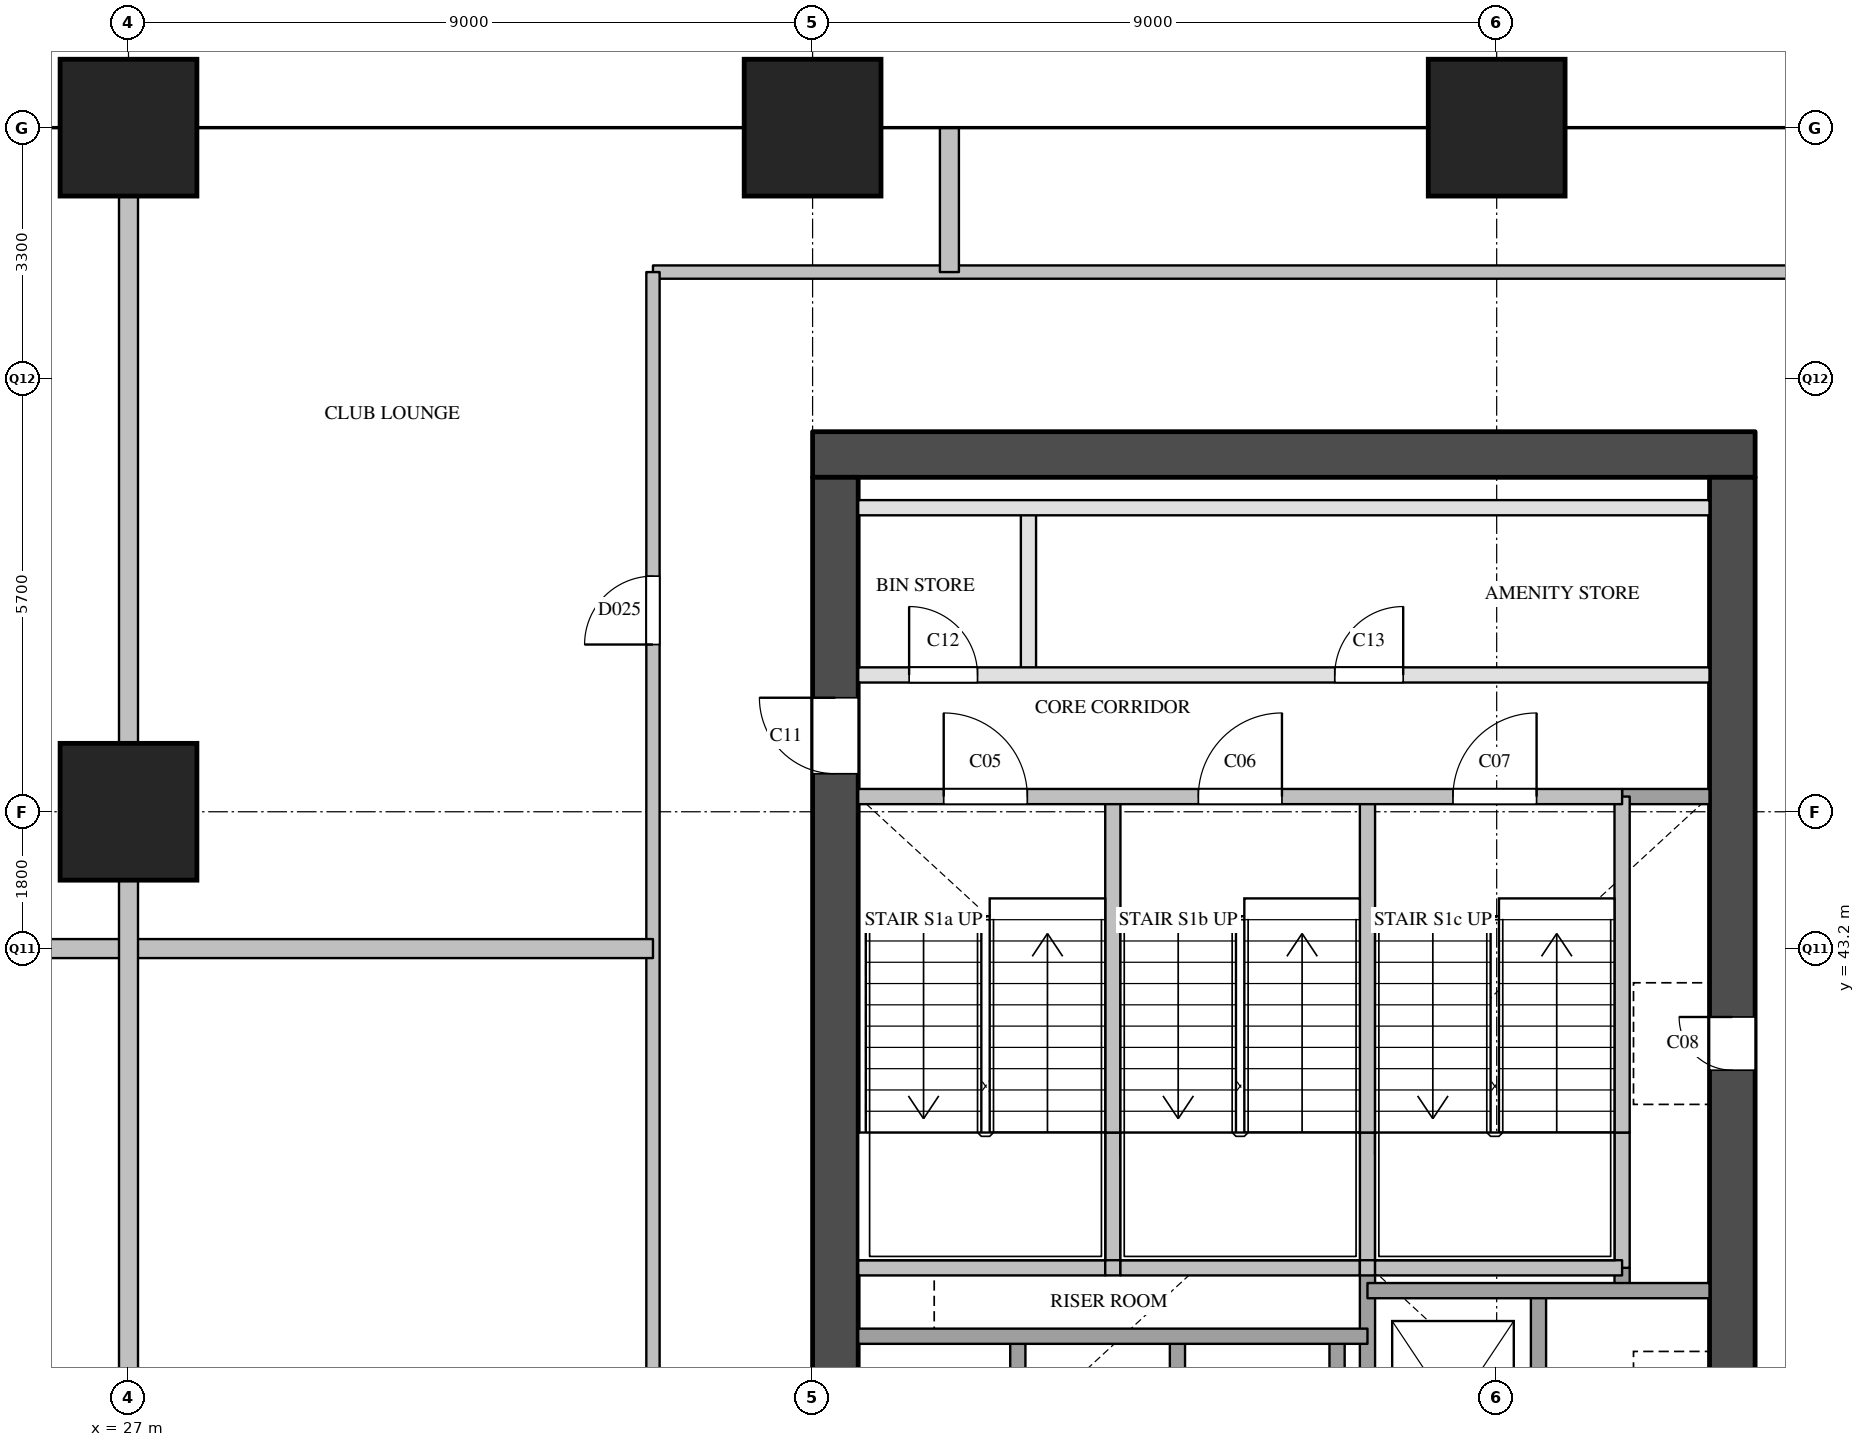
"""IFC4 building model, lengths in metres.
Left out: names, types, materials, properties, quantities, classifications, styles, units other than length and angle.
Written with IfcOpenShell. Run it as: python <this file> out.ifc"""

import sys

from ifc_helpers import new_model, si_unit, direction, frame, frame_2d, origin, origin_2d, place, context, subcontext, project, spatial, rectangle, extrude, element, fill, save


model = new_model("IFC4")
c1 = context("Model", 3, precision=1e-05, world=origin(), true_north=direction((0.0, 1.0)))
c2 = subcontext(c1, "Body", "Model", "MODEL_VIEW")
j1 = project(units=[si_unit("LENGTHUNIT", "METRE"), si_unit("PLANEANGLEUNIT", "RADIAN")], contexts=[c1])
p1 = place(None, origin())
s1 = spatial("IfcSite", under=j1, at=p1, CompositionType="ELEMENT")
p2 = place(p1, origin())
s2 = spatial("IfcBuilding", under=s1, at=p2, CompositionType="ELEMENT")
p3 = place(p2, frame((0.0, 0.0, 61.4)))
s3 = spatial("IfcBuildingStorey", under=s2, at=p3, CompositionType="ELEMENT", Elevation=61.4)
for number, where, z_axis, x_axis in (
    (1, (27.0, 45.0, 0.0), (0.0, 0.0, 1.0), (1.0, 0.0, 0.0)),
    (2, (27.0, 54.0, 0.0), (0.0, 0.0, 1.0), (1.0, 0.0, 0.0)),
    (3, (36.0, 54.0, 0.0), (0.0, 0.0, 1.0), (1.0, 0.0, 0.0)),
    (4, (45.0, 54.0, 0.0), (0.0, 0.0, 1.0), (1.0, 0.0, 0.0)),
):
    element("IfcColumn", number, at=place(p3, frame(where, z_axis=z_axis, x_axis=x_axis)), inside=s3, PredefinedType="COLUMN", context=c2, shape_type="SweptSolid", body=[
        extrude(rectangle(XDim=1.8, YDim=1.8, at=origin_2d()), origin(), (0.0, 0.0, 1.0), 3.8),
    ])
p4 = place(p3, frame((36.0, 49.7, 0.0), z_axis=(0.0, 0.0, 1.0), x_axis=(1.0, 0.0, 0.0)))
e5 = element("IfcWall", 5, at=p4, inside=s3, PredefinedType="SHEAR", context=c2, shape_type="SweptSolid", body=[
    extrude(rectangle(XDim=12.4, YDim=0.6, at=frame_2d((6.2, 0.0))), origin(), (0.0, 0.0, 1.0), 3.5),
])
p5 = place(p3, frame((36.3, 29.1, 0.0), z_axis=(0.0, 0.0, 1.0), x_axis=(0.0, 1.0, 0.0)))
e6 = element("IfcWall", 6, at=p5, inside=s3, PredefinedType="SHEAR", context=c2, shape_type="SweptSolid", body=[
    extrude(rectangle(XDim=20.3, YDim=0.6, at=frame_2d((10.15, 0.0))), origin(), (0.0, 0.0, 1.0), 3.5),
])
p6 = place(p5, frame((3.6, 0.0, 0.0)))
e7 = element("IfcOpeningElement", 7, at=p6, cuts=e6, PredefinedType="OPENING", context=c2, shape_type="SweptSolid", body=[
    extrude(rectangle(XDim=1.8, YDim=2.1, at=frame_2d((0.9, 1.05))), frame((0.0, 0.31, 0.0), z_axis=(0.0, -1.0, 0.0), x_axis=(1.0, 0.0, 0.0)), (0.0, 0.0, 1.0), 0.62),
])
p7 = place(p5, frame((16.4, 0.0, 0.0)))
e8 = element("IfcOpeningElement", 8, at=p7, cuts=e6, PredefinedType="OPENING", context=c2, shape_type="SweptSolid", body=[
    extrude(rectangle(XDim=1.0, YDim=2.1, at=frame_2d((0.5, 1.05))), frame((0.0, 0.31, 0.0), z_axis=(0.0, -1.0, 0.0), x_axis=(1.0, 0.0, 0.0)), (0.0, 0.0, 1.0), 0.62),
])
p8 = place(p3, frame((48.1, 29.1, 0.0), z_axis=(0.0, 0.0, 1.0), x_axis=(0.0, 1.0, 0.0)))
e9 = element("IfcWall", 9, at=p8, inside=s3, PredefinedType="SHEAR", context=c2, shape_type="SweptSolid", body=[
    extrude(rectangle(XDim=20.3, YDim=0.6, at=frame_2d((10.15, 0.0))), origin(), (0.0, 0.0, 1.0), 3.5),
])
p9 = place(p8, frame((12.5, 0.0, 0.0)))
e10 = element("IfcOpeningElement", 10, at=p9, cuts=e9, PredefinedType="OPENING", context=c2, shape_type="SweptSolid", body=[
    extrude(rectangle(XDim=0.7, YDim=2.1, at=frame_2d((0.35, 1.05))), frame((0.0, 0.31, 0.0), z_axis=(0.0, -1.0, 0.0), x_axis=(1.0, 0.0, 0.0)), (0.0, 0.0, 1.0), 0.62),
])
p10 = place(p8, frame((3.9, 0.0, 0.0)))
e11 = element("IfcOpeningElement", 11, at=p10, cuts=e9, PredefinedType="OPENING", context=c2, shape_type="SweptSolid", body=[
    extrude(rectangle(XDim=1.8, YDim=2.1, at=frame_2d((0.9, 1.05))), frame((0.0, 0.31, 0.0), z_axis=(0.0, -1.0, 0.0), x_axis=(1.0, 0.0, 0.0)), (0.0, 0.0, 1.0), 0.62),
])
p11 = place(p3, frame((38.7, 34.9, 0.0), z_axis=(0.0, 0.0, 1.0), x_axis=(0.0, 1.0, 0.0)))
e12 = element("IfcWall", 12, at=p11, inside=s3, PredefinedType="SOLIDWALL", context=c2, shape_type="SweptSolid", body=[
    extrude(rectangle(XDim=3.2, YDim=0.2, at=frame_2d((1.6, 0.0))), origin(), (0.0, 0.0, 1.0), 3.5),
])
p12 = place(p3, frame((38.84, 46.8, 0.0), z_axis=(0.0, 0.0, 1.0), x_axis=(0.0, 1.0, 0.0)))
e13 = element("IfcWall", 13, at=p12, inside=s3, PredefinedType="PARTITIONING", context=c2, shape_type="SweptSolid", body=[
    extrude(rectangle(XDim=2.2, YDim=0.2, at=frame_2d((1.1, 0.0))), origin(), (0.0, 0.0, 1.0), 3.5),
])
p13 = place(p3, frame((39.95, 39.0, 0.0), z_axis=(0.0, 0.0, 1.0), x_axis=(0.0, 1.0, 0.0)))
e14 = element("IfcWall", 14, at=p13, inside=s3, PredefinedType="SOLIDWALL", context=c2, shape_type="SweptSolid", body=[
    extrude(rectangle(XDim=1.78, YDim=0.2, at=frame_2d((0.89, 0.0))), origin(), (0.0, 0.0, 1.0), 3.5),
])
p14 = place(p3, frame((39.95, 40.78, 0.0), z_axis=(0.0, 0.0, 1.0), x_axis=(0.0, 1.0, 0.0)))
e15 = element("IfcWall", 15, at=p14, inside=s3, PredefinedType="SOLIDWALL", context=c2, shape_type="SweptSolid", body=[
    extrude(rectangle(XDim=4.42, YDim=0.2, at=frame_2d((2.21, 0.0))), origin(), (0.0, 0.0, 1.0), 3.5),
])
for number, where, z_axis, x_axis in (
    (16, (40.8, 34.9, 0.0), (0.0, 0.0, 1.0), (0.0, 1.0, 0.0)),
    (17, (42.9, 34.9, 0.0), (0.0, 0.0, 1.0), (0.0, 1.0, 0.0)),
):
    element("IfcWall", number, at=place(p3, frame(where, z_axis=z_axis, x_axis=x_axis)), inside=s3, PredefinedType="SOLIDWALL", context=c2, shape_type="SweptSolid", body=[
        extrude(rectangle(XDim=3.2, YDim=0.2, at=frame_2d((1.6, 0.0))), origin(), (0.0, 0.0, 1.0), 3.5),
    ])
p15 = place(p3, frame((43.3, 29.1, 0.0), z_axis=(0.0, 0.0, 1.0), x_axis=(0.0, 1.0, 0.0)))
e18 = element("IfcWall", 18, at=p15, inside=s3, PredefinedType="SOLIDWALL", context=c2, shape_type="SweptSolid", body=[
    extrude(rectangle(XDim=9.9, YDim=0.2, at=frame_2d((4.95, 0.0))), origin(), (0.0, 0.0, 1.0), 3.5),
])
p16 = place(p3, frame((43.3, 39.0, 0.0), z_axis=(0.0, 0.0, 1.0), x_axis=(0.0, 1.0, 0.0)))
e19 = element("IfcWall", 19, at=p16, inside=s3, PredefinedType="SOLIDWALL", context=c2, shape_type="SweptSolid", body=[
    extrude(rectangle(XDim=1.78, YDim=0.2, at=frame_2d((0.89, 0.0))), origin(), (0.0, 0.0, 1.0), 3.5),
])
p17 = place(p3, frame((43.3, 40.78, 0.0), z_axis=(0.0, 0.0, 1.0), x_axis=(0.0, 1.0, 0.0)))
e20 = element("IfcWall", 20, at=p17, inside=s3, PredefinedType="SOLIDWALL", context=c2, shape_type="SweptSolid", body=[
    extrude(rectangle(XDim=4.42, YDim=0.2, at=frame_2d((2.21, 0.0))), origin(), (0.0, 0.0, 1.0), 3.5),
])
p18 = place(p3, frame((45.55, 35.5, 0.0), z_axis=(0.0, 0.0, 1.0), x_axis=(0.0, 1.0, 0.0)))
e21 = element("IfcWall", 21, at=p18, inside=s3, PredefinedType="SOLIDWALL", context=c2, shape_type="SweptSolid", body=[
    extrude(rectangle(XDim=3.2, YDim=0.2, at=frame_2d((1.6, 0.0))), origin(), (0.0, 0.0, 1.0), 3.5),
])
p19 = place(p3, frame((46.65, 38.7, 0.0), z_axis=(0.0, 0.0, 1.0), x_axis=(0.0, 1.0, 0.0)))
e22 = element("IfcWall", 22, at=p19, inside=s3, PredefinedType="SOLIDWALL", context=c2, shape_type="SweptSolid", body=[
    extrude(rectangle(XDim=0.3, YDim=0.2, at=frame_2d((0.15, 0.0))), origin(), (0.0, 0.0, 1.0), 3.5),
])
p20 = place(p3, frame((46.65, 39.0, 0.0), z_axis=(0.0, 0.0, 1.0), x_axis=(0.0, 1.0, 0.0)))
e23 = element("IfcWall", 23, at=p20, inside=s3, PredefinedType="SOLIDWALL", context=c2, shape_type="SweptSolid", body=[
    extrude(rectangle(XDim=1.78, YDim=0.2, at=frame_2d((0.89, 0.0))), origin(), (0.0, 0.0, 1.0), 3.5),
])
p21 = place(p3, frame((46.65, 40.78, 0.0), z_axis=(0.0, 0.0, 1.0), x_axis=(0.0, 1.0, 0.0)))
e24 = element("IfcWall", 24, at=p21, inside=s3, PredefinedType="SOLIDWALL", context=c2, shape_type="SweptSolid", body=[
    extrude(rectangle(XDim=4.42, YDim=0.2, at=frame_2d((2.21, 0.0))), origin(), (0.0, 0.0, 1.0), 3.5),
])
p22 = place(p3, frame((36.6, 38.1, 0.0), z_axis=(0.0, 0.0, 1.0), x_axis=(1.0, 0.0, 0.0)))
e25 = element("IfcWall", 25, at=p22, inside=s3, PredefinedType="SOLIDWALL", context=c2, shape_type="SweptSolid", body=[
    extrude(rectangle(XDim=6.7, YDim=0.2, at=frame_2d((3.35, 0.0))), origin(), (0.0, 0.0, 1.0), 3.5),
])
p23 = place(p3, frame((43.3, 38.7, 0.0), z_axis=(0.0, 0.0, 1.0), x_axis=(1.0, 0.0, 0.0)))
e26 = element("IfcWall", 26, at=p23, inside=s3, PredefinedType="SOLIDWALL", context=c2, shape_type="SweptSolid", body=[
    extrude(rectangle(XDim=4.5, YDim=0.2, at=frame_2d((2.25, 0.0))), origin(), (0.0, 0.0, 1.0), 3.5),
])
p24 = place(p3, frame((36.6, 39.0, 0.0), z_axis=(0.0, 0.0, 1.0), x_axis=(1.0, 0.0, 0.0)))
e27 = element("IfcWall", 27, at=p24, inside=s3, PredefinedType="SOLIDWALL", context=c2, shape_type="SweptSolid", body=[
    extrude(rectangle(XDim=3.25, YDim=0.2, at=frame_2d((1.625, 0.0))), origin(), (0.0, 0.0, 1.0), 3.5),
])
p25 = place(p3, frame((39.85, 39.0, 0.0), z_axis=(0.0, 0.0, 1.0), x_axis=(1.0, 0.0, 0.0)))
e28 = element("IfcWall", 28, at=p25, inside=s3, PredefinedType="SOLIDWALL", context=c2, shape_type="SweptSolid", body=[
    extrude(rectangle(XDim=0.2, YDim=0.2, at=frame_2d((0.1, 0.0))), origin(), (0.0, 0.0, 1.0), 3.5),
])
p26 = place(p3, frame((40.05, 39.0, 0.0), z_axis=(0.0, 0.0, 1.0), x_axis=(1.0, 0.0, 0.0)))
e29 = element("IfcWall", 29, at=p26, inside=s3, PredefinedType="SOLIDWALL", context=c2, shape_type="SweptSolid", body=[
    extrude(rectangle(XDim=3.15, YDim=0.2, at=frame_2d((1.575, 0.0))), origin(), (0.0, 0.0, 1.0), 3.5),
])
p27 = place(p3, frame((43.2, 39.0, 0.0), z_axis=(0.0, 0.0, 1.0), x_axis=(1.0, 0.0, 0.0)))
e30 = element("IfcWall", 30, at=p27, inside=s3, PredefinedType="SOLIDWALL", context=c2, shape_type="SweptSolid", body=[
    extrude(rectangle(XDim=0.2, YDim=0.2, at=frame_2d((0.1, 0.0))), origin(), (0.0, 0.0, 1.0), 3.5),
])
p28 = place(p3, frame((43.4, 39.0, 0.0), z_axis=(0.0, 0.0, 1.0), x_axis=(1.0, 0.0, 0.0)))
e31 = element("IfcWall", 31, at=p28, inside=s3, PredefinedType="SOLIDWALL", context=c2, shape_type="SweptSolid", body=[
    extrude(rectangle(XDim=3.25, YDim=0.2, at=frame_2d((1.625, 0.0))), origin(), (0.0, 0.0, 1.0), 3.5),
])
p29 = place(p3, frame((46.65, 45.2, 0.0), z_axis=(0.0, 0.0, 1.0), x_axis=(1.0, 0.0, 0.0)))
e32 = element("IfcWall", 32, at=p29, inside=s3, PredefinedType="SOLIDWALL", context=c2, shape_type="SweptSolid", body=[
    extrude(rectangle(XDim=1.15, YDim=0.2, at=frame_2d((0.575, 0.0))), origin(), (0.0, 0.0, 1.0), 3.5),
])
p30 = place(p3, frame((36.6, 45.2, 0.0), z_axis=(0.0, 0.0, 1.0), x_axis=(1.0, 0.0, 0.0)))
e33 = element("IfcWall", 33, at=p30, inside=s3, PredefinedType="SOLIDWALL", context=c2, shape_type="SweptSolid", body=[
    extrude(rectangle(XDim=10.05, YDim=0.2, at=frame_2d((5.025, 0.0))), origin(), (0.0, 0.0, 1.0), 3.5),
])
p31 = place(p30, frame((1.125, 0.0, 0.0)))
e34 = element("IfcOpeningElement", 34, at=p31, cuts=e33, PredefinedType="OPENING", context=c2, shape_type="SweptSolid", body=[
    extrude(rectangle(XDim=1.1, YDim=2.1, at=frame_2d((0.55, 1.05))), frame((0.0, 0.11, 0.0), z_axis=(0.0, -1.0, 0.0), x_axis=(1.0, 0.0, 0.0)), (0.0, 0.0, 1.0), 0.22),
])
p32 = place(p30, frame((4.475, 0.0, 0.0)))
e35 = element("IfcOpeningElement", 35, at=p32, cuts=e33, PredefinedType="OPENING", context=c2, shape_type="SweptSolid", body=[
    extrude(rectangle(XDim=1.1, YDim=2.1, at=frame_2d((0.55, 1.05))), frame((0.0, 0.11, 0.0), z_axis=(0.0, -1.0, 0.0), x_axis=(1.0, 0.0, 0.0)), (0.0, 0.0, 1.0), 0.22),
])
p33 = place(p30, frame((7.825, 0.0, 0.0)))
e36 = element("IfcOpeningElement", 36, at=p33, cuts=e33, PredefinedType="OPENING", context=c2, shape_type="SweptSolid", body=[
    extrude(rectangle(XDim=1.1, YDim=2.1, at=frame_2d((0.55, 1.05))), frame((0.0, 0.11, 0.0), z_axis=(0.0, -1.0, 0.0), x_axis=(1.0, 0.0, 0.0)), (0.0, 0.0, 1.0), 0.22),
])
p34 = place(p3, frame((36.6, 46.8, 0.0), z_axis=(0.0, 0.0, 1.0), x_axis=(1.0, 0.0, 0.0)))
e37 = element("IfcWall", 37, at=p34, inside=s3, PredefinedType="PARTITIONING", context=c2, shape_type="SweptSolid", body=[
    extrude(rectangle(XDim=11.2, YDim=0.2, at=frame_2d((5.6, 0.0))), origin(), (0.0, 0.0, 1.0), 3.5),
])
p35 = place(p34, frame((0.67, 0.0, 0.0)))
e38 = element("IfcOpeningElement", 38, at=p35, cuts=e37, PredefinedType="OPENING", context=c2, shape_type="SweptSolid", body=[
    extrude(rectangle(XDim=0.9, YDim=2.1, at=frame_2d((0.45, 1.05))), frame((0.0, 0.11, 0.0), z_axis=(0.0, -1.0, 0.0), x_axis=(1.0, 0.0, 0.0)), (0.0, 0.0, 1.0), 0.22),
])
p36 = place(p34, frame((6.27, 0.0, 0.0)))
e39 = element("IfcOpeningElement", 39, at=p36, cuts=e37, PredefinedType="OPENING", context=c2, shape_type="SweptSolid", body=[
    extrude(rectangle(XDim=0.9, YDim=2.1, at=frame_2d((0.45, 1.05))), frame((0.0, 0.11, 0.0), z_axis=(0.0, -1.0, 0.0), x_axis=(1.0, 0.0, 0.0)), (0.0, 0.0, 1.0), 0.22),
])
p37 = place(p3, frame((36.6, 49.0, 0.0), z_axis=(0.0, 0.0, 1.0), x_axis=(1.0, 0.0, 0.0)))
e40 = element("IfcWall", 40, at=p37, inside=s3, PredefinedType="PARTITIONING", context=c2, shape_type="SweptSolid", body=[
    extrude(rectangle(XDim=11.2, YDim=0.2, at=frame_2d((5.6, 0.0))), origin(), (0.0, 0.0, 1.0), 3.5),
])
p38 = place(p3, frame((33.9, 52.1, 0.0), z_axis=(0.0, 0.0, 1.0), x_axis=(1.0, 0.0, 0.0)))
e41 = element("IfcWall", 41, at=p38, inside=s3, PredefinedType="PARTITIONING", context=c2, shape_type="SweptSolid", body=[
    extrude(rectangle(XDim=16.6, YDim=0.175, at=frame_2d((8.3, 0.0))), origin(), (0.0, 0.0, 1.0), 3.5),
])
p39 = place(p3, frame((33.9, 28.52, 0.0), z_axis=(0.0, 0.0, 1.0), x_axis=(0.0, 1.0, 0.0)))
e42 = element("IfcWall", 42, at=p39, inside=s3, PredefinedType="PARTITIONING", context=c2, shape_type="SweptSolid", body=[
    extrude(rectangle(XDim=23.58, YDim=0.175, at=frame_2d((11.79, 0.0))), origin(), (0.0, 0.0, 1.0), 3.5),
])
p40 = place(p39, frame((6.84, 0.0, 0.0)))
e43 = element("IfcOpeningElement", 43, at=p40, cuts=e42, PredefinedType="OPENING", context=c2, shape_type="SweptSolid", body=[
    extrude(rectangle(XDim=1.0, YDim=2.1, at=frame_2d((0.5, 1.05))), frame((0.0, 0.097, 0.0), z_axis=(0.0, -1.0, 0.0), x_axis=(1.0, 0.0, 0.0)), (0.0, 0.0, 1.0), 0.195),
])
p41 = place(p39, frame((18.68, 0.0, 0.0)))
e44 = element("IfcOpeningElement", 44, at=p41, cuts=e42, PredefinedType="OPENING", context=c2, shape_type="SweptSolid", body=[
    extrude(rectangle(XDim=0.9, YDim=2.1, at=frame_2d((0.45, 1.05))), frame((0.0, 0.097, 0.0), z_axis=(0.0, -1.0, 0.0), x_axis=(1.0, 0.0, 0.0)), (0.0, 0.0, 1.0), 0.195),
])
p42 = place(p3, frame((20.1, 43.2, 0.0), z_axis=(0.0, 0.0, 1.0), x_axis=(1.0, 0.0, 0.0)))
e45 = element("IfcWall", 45, at=p42, inside=s3, PredefinedType="PARTITIONING", context=c2, shape_type="SweptSolid", body=[
    extrude(rectangle(XDim=13.8, YDim=0.25, at=frame_2d((6.9, 0.0))), origin(), (0.0, 0.0, 1.0), 2.5),
])
p43 = place(p3, frame((27.0, 0.0, 0.0), z_axis=(0.0, 0.0, 1.0), x_axis=(0.0, 1.0, 0.0)))
e46 = element("IfcWall", 46, at=p43, inside=s3, PredefinedType="PARTITIONING", context=c2, shape_type="SweptSolid", body=[
    extrude(rectangle(XDim=54.0, YDim=0.25, at=frame_2d((27.0, 0.0))), origin(), (0.0, 0.0, 1.0), 2.5),
])
p44 = place(p3, frame((37.8, 52.1, 0.0), z_axis=(0.0, 0.0, 1.0), x_axis=(0.0, 1.0, 0.0)))
e47 = element("IfcWall", 47, at=p44, inside=s3, PredefinedType="PARTITIONING", context=c2, shape_type="SweptSolid", body=[
    extrude(rectangle(XDim=1.9, YDim=0.25, at=frame_2d((0.95, 0.0))), origin(), (0.0, 0.0, 1.0), 2.5),
])
p45 = place(p31, origin())
e48 = element("IfcDoor", 48, at=p45, inside=s3, OperationType="SINGLE_SWING_LEFT", PredefinedType="DOOR", context=c2, shape_type="SweptSolid", body=[
    extrude(rectangle(XDim=1.1, YDim=2.1, at=frame_2d((0.55, 1.05))), frame((0.0, 0.025, 0.0), z_axis=(0.0, -1.0, 0.0), x_axis=(1.0, 0.0, 0.0)), (0.0, 0.0, 1.0), 0.05),
])
fill(e34, e48)
p46 = place(p32, origin())
e49 = element("IfcDoor", 49, at=p46, inside=s3, OperationType="SINGLE_SWING_RIGHT", PredefinedType="DOOR", context=c2, shape_type="SweptSolid", body=[
    extrude(rectangle(XDim=1.1, YDim=2.1, at=frame_2d((0.55, 1.05))), frame((0.0, 0.025, 0.0), z_axis=(0.0, -1.0, 0.0), x_axis=(1.0, 0.0, 0.0)), (0.0, 0.0, 1.0), 0.05),
])
fill(e35, e49)
p47 = place(p33, origin())
e50 = element("IfcDoor", 50, at=p47, inside=s3, OperationType="SINGLE_SWING_RIGHT", PredefinedType="DOOR", context=c2, shape_type="SweptSolid", body=[
    extrude(rectangle(XDim=1.1, YDim=2.1, at=frame_2d((0.55, 1.05))), frame((0.0, 0.025, 0.0), z_axis=(0.0, -1.0, 0.0), x_axis=(1.0, 0.0, 0.0)), (0.0, 0.0, 1.0), 0.05),
])
fill(e36, e50)
p48 = place(p9, origin())
e51 = element("IfcDoor", 51, at=p48, inside=s3, OperationType="SINGLE_SWING_RIGHT", PredefinedType="DOOR", context=c2, shape_type="SweptSolid", body=[
    extrude(rectangle(XDim=0.7, YDim=2.1, at=frame_2d((0.35, 1.05))), frame((0.0, 0.025, 0.0), z_axis=(0.0, -1.0, 0.0), x_axis=(1.0, 0.0, 0.0)), (0.0, 0.0, 1.0), 0.05),
])
fill(e10, e51)
p49 = place(p7, origin())
e52 = element("IfcDoor", 52, at=p49, inside=s3, OperationType="SINGLE_SWING_RIGHT", PredefinedType="DOOR", context=c2, shape_type="SweptSolid", body=[
    extrude(rectangle(XDim=1.0, YDim=2.1, at=frame_2d((0.5, 1.05))), frame((0.0, 0.025, 0.0), z_axis=(0.0, -1.0, 0.0), x_axis=(1.0, 0.0, 0.0)), (0.0, 0.0, 1.0), 0.05),
])
fill(e8, e52)
p50 = place(p35, origin())
e53 = element("IfcDoor", 53, at=p50, inside=s3, OperationType="SINGLE_SWING_LEFT", PredefinedType="DOOR", context=c2, shape_type="SweptSolid", body=[
    extrude(rectangle(XDim=0.9, YDim=2.1, at=frame_2d((0.45, 1.05))), frame((0.0, 0.025, 0.0), z_axis=(0.0, -1.0, 0.0), x_axis=(1.0, 0.0, 0.0)), (0.0, 0.0, 1.0), 0.05),
])
fill(e38, e53)
p51 = place(p36, origin())
e54 = element("IfcDoor", 54, at=p51, inside=s3, OperationType="SINGLE_SWING_RIGHT", PredefinedType="DOOR", context=c2, shape_type="SweptSolid", body=[
    extrude(rectangle(XDim=0.9, YDim=2.1, at=frame_2d((0.45, 1.05))), frame((0.0, 0.025, 0.0), z_axis=(0.0, -1.0, 0.0), x_axis=(1.0, 0.0, 0.0)), (0.0, 0.0, 1.0), 0.05),
])
fill(e39, e54)
p52 = place(p41, origin())
e55 = element("IfcDoor", 55, at=p52, inside=s3, OperationType="SINGLE_SWING_LEFT", PredefinedType="DOOR", context=c2, shape_type="SweptSolid", body=[
    extrude(rectangle(XDim=0.9, YDim=2.1, at=frame_2d((0.45, 1.05))), frame((0.0, 0.025, 0.0), z_axis=(0.0, -1.0, 0.0), x_axis=(1.0, 0.0, 0.0)), (0.0, 0.0, 1.0), 0.05),
])
fill(e44, e55)
save(model, sys.argv[1])
